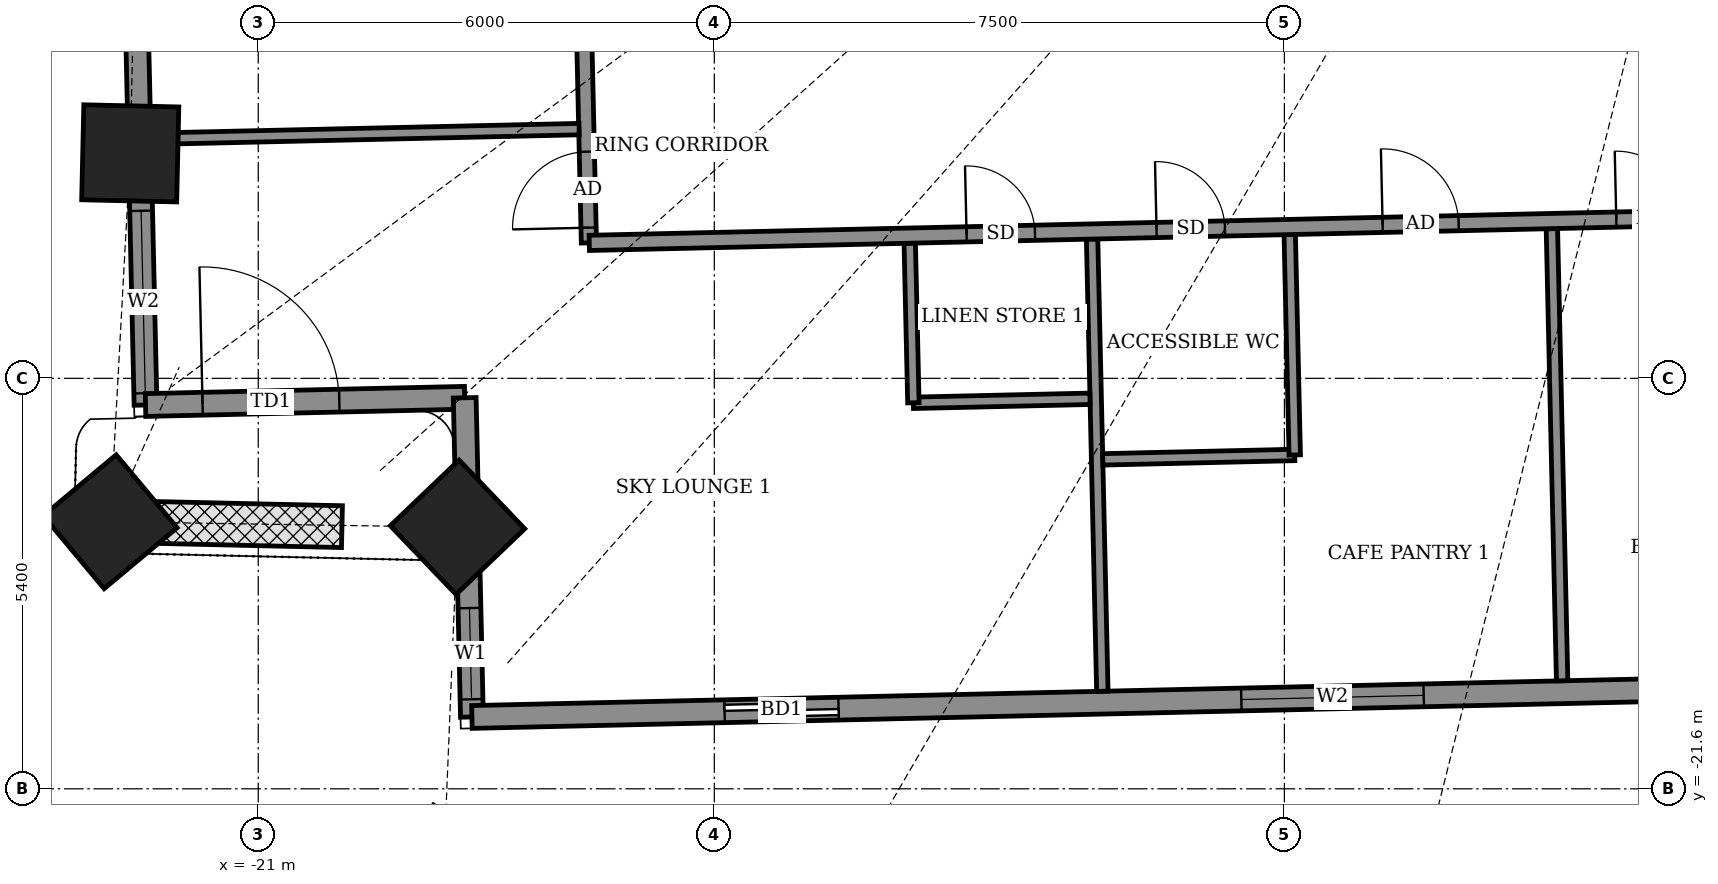
"""IFC4 building model, lengths in metres.
Left out: names, types, materials, properties, quantities, classifications, styles, units other than length and angle.
Written with IfcOpenShell. Run it as: python <this file> out.ifc"""

import sys

from ifc_helpers import new_model, si_unit, direction, frame, frame_2d, origin, origin_2d, place, context, subcontext, project, spatial, rectangle, extrude, element, fill, save


model = new_model("IFC4")
c1 = context("Model", 3, precision=1e-05, world=origin(), true_north=direction((0.0, 1.0)))
c2 = subcontext(c1, "Body", "Model", "MODEL_VIEW")
j1 = project(units=[si_unit("LENGTHUNIT", "METRE"), si_unit("PLANEANGLEUNIT", "RADIAN")], contexts=[c1])
p1 = place(None, origin())
s1 = spatial("IfcSite", under=j1, at=p1, CompositionType="ELEMENT")
p2 = place(p1, origin())
s2 = spatial("IfcBuilding", under=s1, at=p2, CompositionType="ELEMENT")
p3 = place(p2, frame((0.0, 0.0, 170.7)))
s3 = spatial("IfcBuildingStorey", under=s2, at=p3, CompositionType="ELEMENT", Elevation=170.7)
for number, where, z_axis, x_axis in (
    (1, (-22.684, -13.24, -0.55), (0.0, 0.0, 1.0), (-0.023, -1.0, 0.0)),
    (2, (-22.948, -18.086, -0.55), (0.0, 0.0, 1.0), (0.641, -0.768, 0.0)),
    (3, (-18.378, -18.159, -0.55), (0.0, 0.0, 1.0), (0.691, -0.723, 0.0)),
):
    element("IfcColumn", number, at=place(p3, frame(where, z_axis=z_axis, x_axis=x_axis)), inside=s3, PredefinedType="COLUMN", context=c2, shape_type="SweptSolid", body=[
        extrude(rectangle(XDim=1.25, YDim=1.25, at=origin_2d()), origin(), (0.0, 0.0, 1.0), 4.6),
    ])
p4 = place(p3, frame((-22.729, -5.725, 0.0), z_axis=(0.0, 0.0, 1.0), x_axis=(0.022726014582, -0.999741730779, 0.0)))
e4 = element("IfcWall", 4, at=p4, inside=s3, PredefinedType="SOLIDWALL", context=c2, shape_type="SweptSolid", body=[
    extrude(rectangle(XDim=10.829, YDim=0.3, at=frame_2d((5.414, 0.0))), origin(), (0.0, 0.0, 1.0), 2.75),
])
p5 = place(p4, frame((4.136, 0.0, 0.0)))
e5 = element("IfcOpeningElement", 5, at=p5, cuts=e4, PredefinedType="OPENING", context=c2, shape_type="SweptSolid", body=[
    extrude(rectangle(XDim=1.5, YDim=2.4, at=frame_2d((0.75, 1.2))), frame((0.0, 0.16, 0.0), z_axis=(0.0, -1.0, 0.0), x_axis=(1.0, 0.0, 0.0)), (0.0, 0.0, 1.0), 0.32),
])
p6 = place(p4, frame((8.273, 0.0, 0.9)))
e6 = element("IfcOpeningElement", 6, at=p6, cuts=e4, PredefinedType="OPENING", context=c2, shape_type="SweptSolid", body=[
    extrude(rectangle(XDim=2.4, YDim=1.5, at=frame_2d((1.2, 0.75))), frame((0.0, 0.16, 0.0), z_axis=(0.0, -1.0, 0.0), x_axis=(1.0, 0.0, 0.0)), (0.0, 0.0, 1.0), 0.32),
])
p7 = place(p3, frame((-22.483, -16.551, 0.0), z_axis=(0.0, 0.0, 1.0), x_axis=(0.999744320311, 0.022611811187, 0.0)))
e7 = element("IfcWall", 7, at=p7, inside=s3, PredefinedType="SOLIDWALL", context=c2, shape_type="SweptSolid", body=[
    extrude(rectangle(XDim=4.2, YDim=0.3, at=frame_2d((2.1, 0.0))), origin(), (0.0, 0.0, 1.0), 2.75),
])
p8 = place(p7, frame((0.75, 0.0, 0.0)))
e8 = element("IfcOpeningElement", 8, at=p8, cuts=e7, PredefinedType="OPENING", context=c2, shape_type="SweptSolid", body=[
    extrude(rectangle(XDim=1.8, YDim=2.4, at=frame_2d((0.9, 1.2))), frame((0.0, 0.16, 0.0), z_axis=(0.0, -1.0, 0.0), x_axis=(1.0, 0.0, 0.0)), (0.0, 0.0, 1.0), 0.32),
])
p9 = place(p3, frame((-18.284, -16.456, 0.0), z_axis=(0.0, 0.0, 1.0), x_axis=(0.022611811187, -0.999744320311, 0.0)))
e9 = element("IfcWall", 9, at=p9, inside=s3, PredefinedType="SOLIDWALL", context=c2, shape_type="SweptSolid", body=[
    extrude(rectangle(XDim=4.2, YDim=0.3, at=frame_2d((2.1, 0.0))), origin(), (0.0, 0.0, 1.0), 2.75),
])
p10 = place(p9, frame((2.767, 0.0, 0.9)))
e10 = element("IfcOpeningElement", 10, at=p10, cuts=e9, PredefinedType="OPENING", context=c2, shape_type="SweptSolid", body=[
    extrude(rectangle(XDim=1.2, YDim=1.5, at=frame_2d((0.6, 0.75))), frame((0.0, 0.16, 0.0), z_axis=(0.0, -1.0, 0.0), x_axis=(1.0, 0.0, 0.0)), (0.0, 0.0, 1.0), 0.32),
])
p11 = place(p3, frame((-18.189, -20.655, 0.0), z_axis=(0.0, 0.0, 1.0), x_axis=(0.999742285265, 0.022701609063, 0.0)))
e11 = element("IfcWall", 11, at=p11, inside=s3, PredefinedType="SOLIDWALL", context=c2, shape_type="SweptSolid", body=[
    extrude(rectangle(XDim=39.78, YDim=0.3, at=frame_2d((19.89, 0.0))), origin(), (0.0, 0.0, 1.0), 2.55),
])
p12 = place(p11, frame((3.325, 0.0, 0.0)))
e12 = element("IfcOpeningElement", 12, at=p12, cuts=e11, PredefinedType="OPENING", context=c2, shape_type="SweptSolid", body=[
    extrude(rectangle(XDim=1.5, YDim=2.4, at=frame_2d((0.75, 1.2))), frame((0.0, 0.16, 0.0), z_axis=(0.0, -1.0, 0.0), x_axis=(1.0, 0.0, 0.0)), (0.0, 0.0, 1.0), 0.32),
])
p13 = place(p11, frame((10.125, 0.0, 0.9)))
e13 = element("IfcOpeningElement", 13, at=p13, cuts=e11, PredefinedType="OPENING", context=c2, shape_type="SweptSolid", body=[
    extrude(rectangle(XDim=2.4, YDim=1.5, at=frame_2d((1.2, 0.75))), frame((0.0, 0.16, 0.0), z_axis=(0.0, -1.0, 0.0), x_axis=(1.0, 0.0, 0.0)), (0.0, 0.0, 1.0), 0.32),
])
p14 = place(p11, frame((16.1, 0.0, 0.0)))
e14 = element("IfcOpeningElement", 14, at=p14, cuts=e11, PredefinedType="OPENING", context=c2, shape_type="SweptSolid", body=[
    extrude(rectangle(XDim=1.5, YDim=2.4, at=frame_2d((0.75, 1.2))), frame((0.0, 0.16, 0.0), z_axis=(0.0, -1.0, 0.0), x_axis=(1.0, 0.0, 0.0)), (0.0, 0.0, 1.0), 0.32),
])
p15 = place(p11, frame((21.1, 0.0, 0.0)))
e15 = element("IfcOpeningElement", 15, at=p15, cuts=e11, PredefinedType="OPENING", context=c2, shape_type="SweptSolid", body=[
    extrude(rectangle(XDim=1.5, YDim=2.4, at=frame_2d((0.75, 1.2))), frame((0.0, 0.16, 0.0), z_axis=(0.0, -1.0, 0.0), x_axis=(1.0, 0.0, 0.0)), (0.0, 0.0, 1.0), 0.32),
])
p16 = place(p11, frame((25.525, 0.0, 0.9)))
e16 = element("IfcOpeningElement", 16, at=p16, cuts=e11, PredefinedType="OPENING", context=c2, shape_type="SweptSolid", body=[
    extrude(rectangle(XDim=2.4, YDim=1.5, at=frame_2d((1.2, 0.75))), frame((0.0, 0.16, 0.0), z_axis=(0.0, -1.0, 0.0), x_axis=(1.0, 0.0, 0.0)), (0.0, 0.0, 1.0), 0.32),
])
p17 = place(p11, frame((30.95, 0.0, 0.9)))
e17 = element("IfcOpeningElement", 17, at=p17, cuts=e11, PredefinedType="OPENING", context=c2, shape_type="SweptSolid", body=[
    extrude(rectangle(XDim=2.4, YDim=1.5, at=frame_2d((1.2, 0.75))), frame((0.0, 0.16, 0.0), z_axis=(0.0, -1.0, 0.0), x_axis=(1.0, 0.0, 0.0)), (0.0, 0.0, 1.0), 0.32),
])
p18 = place(p11, frame((36.365, 0.0, 0.9)))
e18 = element("IfcOpeningElement", 18, at=p18, cuts=e11, PredefinedType="OPENING", context=c2, shape_type="SweptSolid", body=[
    extrude(rectangle(XDim=2.4, YDim=1.5, at=frame_2d((1.2, 0.75))), frame((0.0, 0.16, 0.0), z_axis=(0.0, -1.0, 0.0), x_axis=(1.0, 0.0, 0.0)), (0.0, 0.0, 1.0), 0.32),
])
p19 = place(p3, frame((-19.899, -18.151, 0.0), z_axis=(0.0, 0.0, 1.0), x_axis=(-0.99974919145, 0.022395405678, 0.0)))
e19 = element("IfcWall", 19, at=p19, inside=s3, PredefinedType="USERDEFINED", context=c2, shape_type="SweptSolid", body=[
    extrude(rectangle(XDim=2.671, YDim=0.55, at=frame_2d((1.335, 0.0))), origin(), (0.0, 0.0, 1.0), 0.8),
])
p20 = place(p3, frame((-9.895, -20.317, 0.0), z_axis=(0.0, 0.0, 1.0), x_axis=(-0.022688785847, 0.999742576365, 0.0)))
e20 = element("IfcWall", 20, at=p20, inside=s3, PredefinedType="PARTITIONING", context=c2, shape_type="SweptSolid", body=[
    extrude(rectangle(XDim=5.95, YDim=0.15, at=frame_2d((2.975, 0.0))), origin(), (0.0, 0.0, 1.0), 2.75),
])
p21 = place(p3, frame((-3.846, -20.179, 0.0), z_axis=(0.0, 0.0, 1.0), x_axis=(-0.022692509051, 0.999742491861, 0.0)))
e21 = element("IfcWall", 21, at=p21, inside=s3, PredefinedType="PARTITIONING", context=c2, shape_type="SweptSolid", body=[
    extrude(rectangle(XDim=5.949, YDim=0.15, at=frame_2d((2.975, 0.0))), origin(), (0.0, 0.0, 1.0), 2.85),
])
p22 = place(p3, frame((-9.889, -17.266, 0.0), z_axis=(0.0, 0.0, 1.0), x_axis=(0.999735307039, 0.023006865507, 0.0)))
e22 = element("IfcWall", 22, at=p22, inside=s3, PredefinedType="PARTITIONING", context=c2, shape_type="SweptSolid", body=[
    extrude(rectangle(XDim=2.526, YDim=0.15, at=frame_2d((1.263, 0.0))), origin(), (0.0, 0.0, 1.0), 2.75),
])
p23 = place(p3, frame((-7.364, -17.208, 0.0), z_axis=(0.0, 0.0, 1.0), x_axis=(-0.022732880677, 0.999741574676, 0.0)))
e23 = element("IfcWall", 23, at=p23, inside=s3, PredefinedType="PARTITIONING", context=c2, shape_type="SweptSolid", body=[
    extrude(rectangle(XDim=2.9, YDim=0.15, at=frame_2d((1.45, 0.0))), origin(), (0.0, 0.0, 1.0), 4.05),
])
p24 = place(p3, frame((-12.381, -16.522, 0.0), z_axis=(0.0, 0.0, 1.0), x_axis=(0.99974031529, 0.022788198363, 0.0)))
e24 = element("IfcWall", 24, at=p24, inside=s3, PredefinedType="PARTITIONING", context=c2, shape_type="SweptSolid", body=[
    extrude(rectangle(XDim=2.325, YDim=0.15, at=frame_2d((1.162, 0.0))), origin(), (0.0, 0.0, 1.0), 2.75),
])
p25 = place(p3, frame((-12.381, -16.522, 0.0), z_axis=(0.0, 0.0, 1.0), x_axis=(-0.022782133344, 0.999740453518, 0.0)))
e25 = element("IfcWall", 25, at=p25, inside=s3, PredefinedType="PARTITIONING", context=c2, shape_type="SweptSolid", body=[
    extrude(rectangle(XDim=2.1, YDim=0.15, at=frame_2d((1.05, 0.0))), origin(), (0.0, 0.0, 1.0), 2.85),
])
p26 = place(p3, frame((-16.65, -14.418, 0.0), z_axis=(0.0, 0.0, 1.0), x_axis=(-0.022695485329, 0.9997424243, 0.0)))
e26 = element("IfcWall", 26, at=p26, inside=s3, PredefinedType="PARTITIONING", context=c2, shape_type="SweptSolid", body=[
    extrude(rectangle(XDim=31.024, YDim=0.2, at=frame_2d((15.512, 0.0))), origin(), (0.0, 0.0, 1.0), 2.75),
])
p27 = place(p26, frame((0.2, 0.0, 0.0)))
e27 = element("IfcOpeningElement", 27, at=p27, cuts=e26, PredefinedType="OPENING", context=c2, shape_type="SweptSolid", body=[
    extrude(rectangle(XDim=1.0, YDim=2.1, at=frame_2d((0.5, 1.05))), frame((0.0, 0.11, 0.0), z_axis=(0.0, -1.0, 0.0), x_axis=(1.0, 0.0, 0.0)), (0.0, 0.0, 1.0), 0.22),
])
p28 = place(p26, frame((25.525, 0.0, 0.0)))
e28 = element("IfcOpeningElement", 28, at=p28, cuts=e26, PredefinedType="OPENING", context=c2, shape_type="SweptSolid", body=[
    extrude(rectangle(XDim=1.0, YDim=2.1, at=frame_2d((0.5, 1.05))), frame((0.0, 0.11, 0.0), z_axis=(0.0, -1.0, 0.0), x_axis=(1.0, 0.0, 0.0)), (0.0, 0.0, 1.0), 0.22),
])
p29 = place(p26, frame((19.595, 0.0, 0.0)))
e29 = element("IfcOpeningElement", 29, at=p29, cuts=e26, PredefinedType="OPENING", context=c2, shape_type="SweptSolid", body=[
    extrude(rectangle(XDim=1.0, YDim=2.1, at=frame_2d((0.5, 1.05))), frame((0.0, 0.11, 0.0), z_axis=(0.0, -1.0, 0.0), x_axis=(1.0, 0.0, 0.0)), (0.0, 0.0, 1.0), 0.22),
])
p30 = place(p26, frame((13.825, 0.0, 0.0)))
e30 = element("IfcOpeningElement", 30, at=p30, cuts=e26, PredefinedType="OPENING", context=c2, shape_type="SweptSolid", body=[
    extrude(rectangle(XDim=1.0, YDim=2.1, at=frame_2d((0.5, 1.05))), frame((0.0, 0.11, 0.0), z_axis=(0.0, -1.0, 0.0), x_axis=(1.0, 0.0, 0.0)), (0.0, 0.0, 1.0), 0.22),
])
p31 = place(p26, frame((16.275, 0.0, 0.0)))
e31 = element("IfcOpeningElement", 31, at=p31, cuts=e26, PredefinedType="OPENING", context=c2, shape_type="SweptSolid", body=[
    extrude(rectangle(XDim=0.9, YDim=2.1, at=frame_2d((0.45, 1.05))), frame((0.0, 0.11, 0.0), z_axis=(0.0, -1.0, 0.0), x_axis=(1.0, 0.0, 0.0)), (0.0, 0.0, 1.0), 0.22),
])
p32 = place(p26, frame((11.65, 0.0, 0.0)))
e32 = element("IfcOpeningElement", 32, at=p32, cuts=e26, PredefinedType="OPENING", context=c2, shape_type="SweptSolid", body=[
    extrude(rectangle(XDim=1.0, YDim=2.1, at=frame_2d((0.5, 1.05))), frame((0.0, 0.11, 0.0), z_axis=(0.0, -1.0, 0.0), x_axis=(1.0, 0.0, 0.0)), (0.0, 0.0, 1.0), 0.22),
])
p33 = place(p26, frame((9.525, 0.0, 0.0)))
e33 = element("IfcOpeningElement", 33, at=p33, cuts=e26, PredefinedType="OPENING", context=c2, shape_type="SweptSolid", body=[
    extrude(rectangle(XDim=0.9, YDim=2.1, at=frame_2d((0.45, 1.05))), frame((0.0, 0.11, 0.0), z_axis=(0.0, -1.0, 0.0), x_axis=(1.0, 0.0, 0.0)), (0.0, 0.0, 1.0), 0.22),
])
p34 = place(p26, frame((3.337, 0.0, 0.0)))
e34 = element("IfcOpeningElement", 34, at=p34, cuts=e26, PredefinedType="OPENING", context=c2, shape_type="SweptSolid", body=[
    extrude(rectangle(XDim=1.0, YDim=2.1, at=frame_2d((0.5, 1.05))), frame((0.0, 0.11, 0.0), z_axis=(0.0, -1.0, 0.0), x_axis=(1.0, 0.0, 0.0)), (0.0, 0.0, 1.0), 0.22),
])
p35 = place(p26, frame((7.025, 0.0, 0.0)))
e35 = element("IfcOpeningElement", 35, at=p35, cuts=e26, PredefinedType="OPENING", context=c2, shape_type="SweptSolid", body=[
    extrude(rectangle(XDim=0.9, YDim=2.1, at=frame_2d((0.45, 1.05))), frame((0.0, 0.11, 0.0), z_axis=(0.0, -1.0, 0.0), x_axis=(1.0, 0.0, 0.0)), (0.0, 0.0, 1.0), 0.22),
])
p36 = place(p3, frame((-16.645, -14.418, 0.0), z_axis=(0.0, 0.0, 1.0), x_axis=(0.999742564802, 0.022689295346, 0.0)))
e36 = element("IfcWall", 36, at=p36, inside=s3, PredefinedType="PARTITIONING", context=c2, shape_type="SweptSolid", body=[
    extrude(rectangle(XDim=40.587, YDim=0.2, at=frame_2d((20.294, 0.0))), origin(), (0.0, 0.0, 1.0), 2.55),
])
p37 = place(p36, frame((4.965, 0.0, 0.0)))
e37 = element("IfcOpeningElement", 37, at=p37, cuts=e36, PredefinedType="OPENING", context=c2, shape_type="SweptSolid", body=[
    extrude(rectangle(XDim=0.9, YDim=2.1, at=frame_2d((0.45, 1.05))), frame((0.0, 0.11, 0.0), z_axis=(0.0, -1.0, 0.0), x_axis=(1.0, 0.0, 0.0)), (0.0, 0.0, 1.0), 0.22),
])
p38 = place(p36, frame((10.44, 0.0, 0.0)))
e38 = element("IfcOpeningElement", 38, at=p38, cuts=e36, PredefinedType="OPENING", context=c2, shape_type="SweptSolid", body=[
    extrude(rectangle(XDim=1.0, YDim=2.1, at=frame_2d((0.5, 1.05))), frame((0.0, 0.11, 0.0), z_axis=(0.0, -1.0, 0.0), x_axis=(1.0, 0.0, 0.0)), (0.0, 0.0, 1.0), 0.22),
])
p39 = place(p36, frame((7.465, 0.0, 0.0)))
e39 = element("IfcOpeningElement", 39, at=p39, cuts=e36, PredefinedType="OPENING", context=c2, shape_type="SweptSolid", body=[
    extrude(rectangle(XDim=0.9, YDim=2.1, at=frame_2d((0.45, 1.05))), frame((0.0, 0.11, 0.0), z_axis=(0.0, -1.0, 0.0), x_axis=(1.0, 0.0, 0.0)), (0.0, 0.0, 1.0), 0.22),
])
p40 = place(p36, frame((13.515, 0.0, 0.0)))
e40 = element("IfcOpeningElement", 40, at=p40, cuts=e36, PredefinedType="OPENING", context=c2, shape_type="SweptSolid", body=[
    extrude(rectangle(XDim=0.9, YDim=2.1, at=frame_2d((0.45, 1.05))), frame((0.0, 0.11, 0.0), z_axis=(0.0, -1.0, 0.0), x_axis=(1.0, 0.0, 0.0)), (0.0, 0.0, 1.0), 0.22),
])
p41 = place(p36, frame((20.915, 0.0, 0.0)))
e41 = element("IfcOpeningElement", 41, at=p41, cuts=e36, PredefinedType="OPENING", context=c2, shape_type="SweptSolid", body=[
    extrude(rectangle(XDim=0.9, YDim=2.1, at=frame_2d((0.45, 1.05))), frame((0.0, 0.11, 0.0), z_axis=(0.0, -1.0, 0.0), x_axis=(1.0, 0.0, 0.0)), (0.0, 0.0, 1.0), 0.22),
])
p42 = place(p36, frame((23.24, 0.0, 0.0)))
e42 = element("IfcOpeningElement", 42, at=p42, cuts=e36, PredefinedType="OPENING", context=c2, shape_type="SweptSolid", body=[
    extrude(rectangle(XDim=1.0, YDim=2.1, at=frame_2d((0.5, 1.05))), frame((0.0, 0.11, 0.0), z_axis=(0.0, -1.0, 0.0), x_axis=(1.0, 0.0, 0.0)), (0.0, 0.0, 1.0), 0.22),
])
p43 = place(p36, frame((25.665, 0.0, 0.0)))
e43 = element("IfcOpeningElement", 43, at=p43, cuts=e36, PredefinedType="OPENING", context=c2, shape_type="SweptSolid", body=[
    extrude(rectangle(XDim=0.9, YDim=2.1, at=frame_2d((0.45, 1.05))), frame((0.0, 0.11, 0.0), z_axis=(0.0, -1.0, 0.0), x_axis=(1.0, 0.0, 0.0)), (0.0, 0.0, 1.0), 0.22),
])
p44 = place(p36, frame((31.265, 0.0, 0.0)))
e44 = element("IfcOpeningElement", 44, at=p44, cuts=e36, PredefinedType="OPENING", context=c2, shape_type="SweptSolid", body=[
    extrude(rectangle(XDim=1.0, YDim=2.1, at=frame_2d((0.5, 1.05))), frame((0.0, 0.11, 0.0), z_axis=(0.0, -1.0, 0.0), x_axis=(1.0, 0.0, 0.0)), (0.0, 0.0, 1.0), 0.22),
])
p45 = place(p36, frame((28.265, 0.0, 0.0)))
e45 = element("IfcOpeningElement", 45, at=p45, cuts=e36, PredefinedType="OPENING", context=c2, shape_type="SweptSolid", body=[
    extrude(rectangle(XDim=0.9, YDim=2.1, at=frame_2d((0.45, 1.05))), frame((0.0, 0.11, 0.0), z_axis=(0.0, -1.0, 0.0), x_axis=(1.0, 0.0, 0.0)), (0.0, 0.0, 1.0), 0.22),
])
p46 = place(p36, frame((39.18, 0.0, 0.0)))
e46 = element("IfcOpeningElement", 46, at=p46, cuts=e36, PredefinedType="OPENING", context=c2, shape_type="SweptSolid", body=[
    extrude(rectangle(XDim=1.0, YDim=2.1, at=frame_2d((0.5, 1.05))), frame((0.0, 0.11, 0.0), z_axis=(0.0, -1.0, 0.0), x_axis=(1.0, 0.0, 0.0)), (0.0, 0.0, 1.0), 0.22),
])
p47 = place(p36, frame((34.365, 0.0, 0.0)))
e47 = element("IfcOpeningElement", 47, at=p47, cuts=e36, PredefinedType="OPENING", context=c2, shape_type="SweptSolid", body=[
    extrude(rectangle(XDim=0.9, YDim=2.1, at=frame_2d((0.45, 1.05))), frame((0.0, 0.11, 0.0), z_axis=(0.0, -1.0, 0.0), x_axis=(1.0, 0.0, 0.0)), (0.0, 0.0, 1.0), 0.22),
])
p48 = place(p3, frame((-22.713, -13.055, 0.0), z_axis=(0.0, 0.0, 1.0), x_axis=(0.999744989952, 0.022582184714, 0.0)))
e48 = element("IfcWall", 48, at=p48, inside=s3, PredefinedType="PARTITIONING", context=c2, shape_type="SweptSolid", body=[
    extrude(rectangle(XDim=5.935, YDim=0.15, at=frame_2d((2.968, 0.0))), origin(), (0.0, 0.0, 1.0), 2.85),
])
p49 = place(p6, origin())
e49 = element("IfcWindow", 49, at=p49, inside=s3, PartitioningType="DOUBLE_PANEL_VERTICAL", PredefinedType="WINDOW", context=c2, shape_type="SweptSolid", body=[
    extrude(rectangle(XDim=2.4, YDim=1.5, at=frame_2d((1.2, 0.75))), frame((0.0, 0.03, 0.0), z_axis=(0.0, -1.0, 0.0), x_axis=(1.0, 0.0, 0.0)), (0.0, 0.0, 1.0), 0.06),
])
fill(e6, e49)
p50 = place(p8, origin())
e50 = element("IfcDoor", 50, at=p50, inside=s3, OperationType="DOUBLE_DOOR_SINGLE_SWING", PredefinedType="DOOR", context=c2, shape_type="SweptSolid", body=[
    extrude(rectangle(XDim=1.8, YDim=2.4, at=frame_2d((0.9, 1.2))), frame((0.0, 0.025, 0.0), z_axis=(0.0, -1.0, 0.0), x_axis=(1.0, 0.0, 0.0)), (0.0, 0.0, 1.0), 0.05),
])
fill(e8, e50)
p51 = place(p10, origin())
e51 = element("IfcWindow", 51, at=p51, inside=s3, PartitioningType="SINGLE_PANEL", PredefinedType="WINDOW", context=c2, shape_type="SweptSolid", body=[
    extrude(rectangle(XDim=1.2, YDim=1.5, at=frame_2d((0.6, 0.75))), frame((0.0, 0.03, 0.0), z_axis=(0.0, -1.0, 0.0), x_axis=(1.0, 0.0, 0.0)), (0.0, 0.0, 1.0), 0.06),
])
fill(e10, e51)
p52 = place(p12, origin())
e52 = element("IfcDoor", 52, at=p52, inside=s3, OperationType="SLIDING_TO_LEFT", PredefinedType="DOOR", context=c2, shape_type="SweptSolid", body=[
    extrude(rectangle(XDim=1.5, YDim=2.4, at=frame_2d((0.75, 1.2))), frame((0.0, 0.025, 0.0), z_axis=(0.0, -1.0, 0.0), x_axis=(1.0, 0.0, 0.0)), (0.0, 0.0, 1.0), 0.05),
])
fill(e12, e52)
p53 = place(p13, origin())
e53 = element("IfcWindow", 53, at=p53, inside=s3, PartitioningType="DOUBLE_PANEL_VERTICAL", PredefinedType="WINDOW", context=c2, shape_type="SweptSolid", body=[
    extrude(rectangle(XDim=2.4, YDim=1.5, at=frame_2d((1.2, 0.75))), frame((0.0, 0.03, 0.0), z_axis=(0.0, -1.0, 0.0), x_axis=(1.0, 0.0, 0.0)), (0.0, 0.0, 1.0), 0.06),
])
fill(e13, e53)
p54 = place(p27, origin())
e54 = element("IfcDoor", 54, at=p54, inside=s3, OperationType="SINGLE_SWING_LEFT", PredefinedType="DOOR", context=c2, shape_type="SweptSolid", body=[
    extrude(rectangle(XDim=1.0, YDim=2.1, at=frame_2d((0.5, 1.05))), frame((0.0, 0.025, 0.0), z_axis=(0.0, -1.0, 0.0), x_axis=(1.0, 0.0, 0.0)), (0.0, 0.0, 1.0), 0.05),
])
fill(e27, e54)
p55 = place(p37, origin())
e55 = element("IfcDoor", 55, at=p55, inside=s3, OperationType="SINGLE_SWING_LEFT", PredefinedType="DOOR", context=c2, shape_type="SweptSolid", body=[
    extrude(rectangle(XDim=0.9, YDim=2.1, at=frame_2d((0.45, 1.05))), frame((0.0, 0.025, 0.0), z_axis=(0.0, -1.0, 0.0), x_axis=(1.0, 0.0, 0.0)), (0.0, 0.0, 1.0), 0.05),
])
fill(e37, e55)
p56 = place(p38, origin())
e56 = element("IfcDoor", 56, at=p56, inside=s3, OperationType="SINGLE_SWING_RIGHT", PredefinedType="DOOR", context=c2, shape_type="SweptSolid", body=[
    extrude(rectangle(XDim=1.0, YDim=2.1, at=frame_2d((0.5, 1.05))), frame((0.0, 0.025, 0.0), z_axis=(0.0, -1.0, 0.0), x_axis=(1.0, 0.0, 0.0)), (0.0, 0.0, 1.0), 0.05),
])
fill(e38, e56)
p57 = place(p39, origin())
e57 = element("IfcDoor", 57, at=p57, inside=s3, OperationType="SINGLE_SWING_RIGHT", PredefinedType="DOOR", context=c2, shape_type="SweptSolid", body=[
    extrude(rectangle(XDim=0.9, YDim=2.1, at=frame_2d((0.45, 1.05))), frame((0.0, 0.025, 0.0), z_axis=(0.0, -1.0, 0.0), x_axis=(1.0, 0.0, 0.0)), (0.0, 0.0, 1.0), 0.05),
])
fill(e39, e57)
p58 = place(p40, origin())
e58 = element("IfcDoor", 58, at=p58, inside=s3, OperationType="SINGLE_SWING_LEFT", PredefinedType="DOOR", context=c2, shape_type="SweptSolid", body=[
    extrude(rectangle(XDim=0.9, YDim=2.1, at=frame_2d((0.45, 1.05))), frame((0.0, 0.025, 0.0), z_axis=(0.0, -1.0, 0.0), x_axis=(1.0, 0.0, 0.0)), (0.0, 0.0, 1.0), 0.05),
])
fill(e40, e58)
save(model, sys.argv[1])
